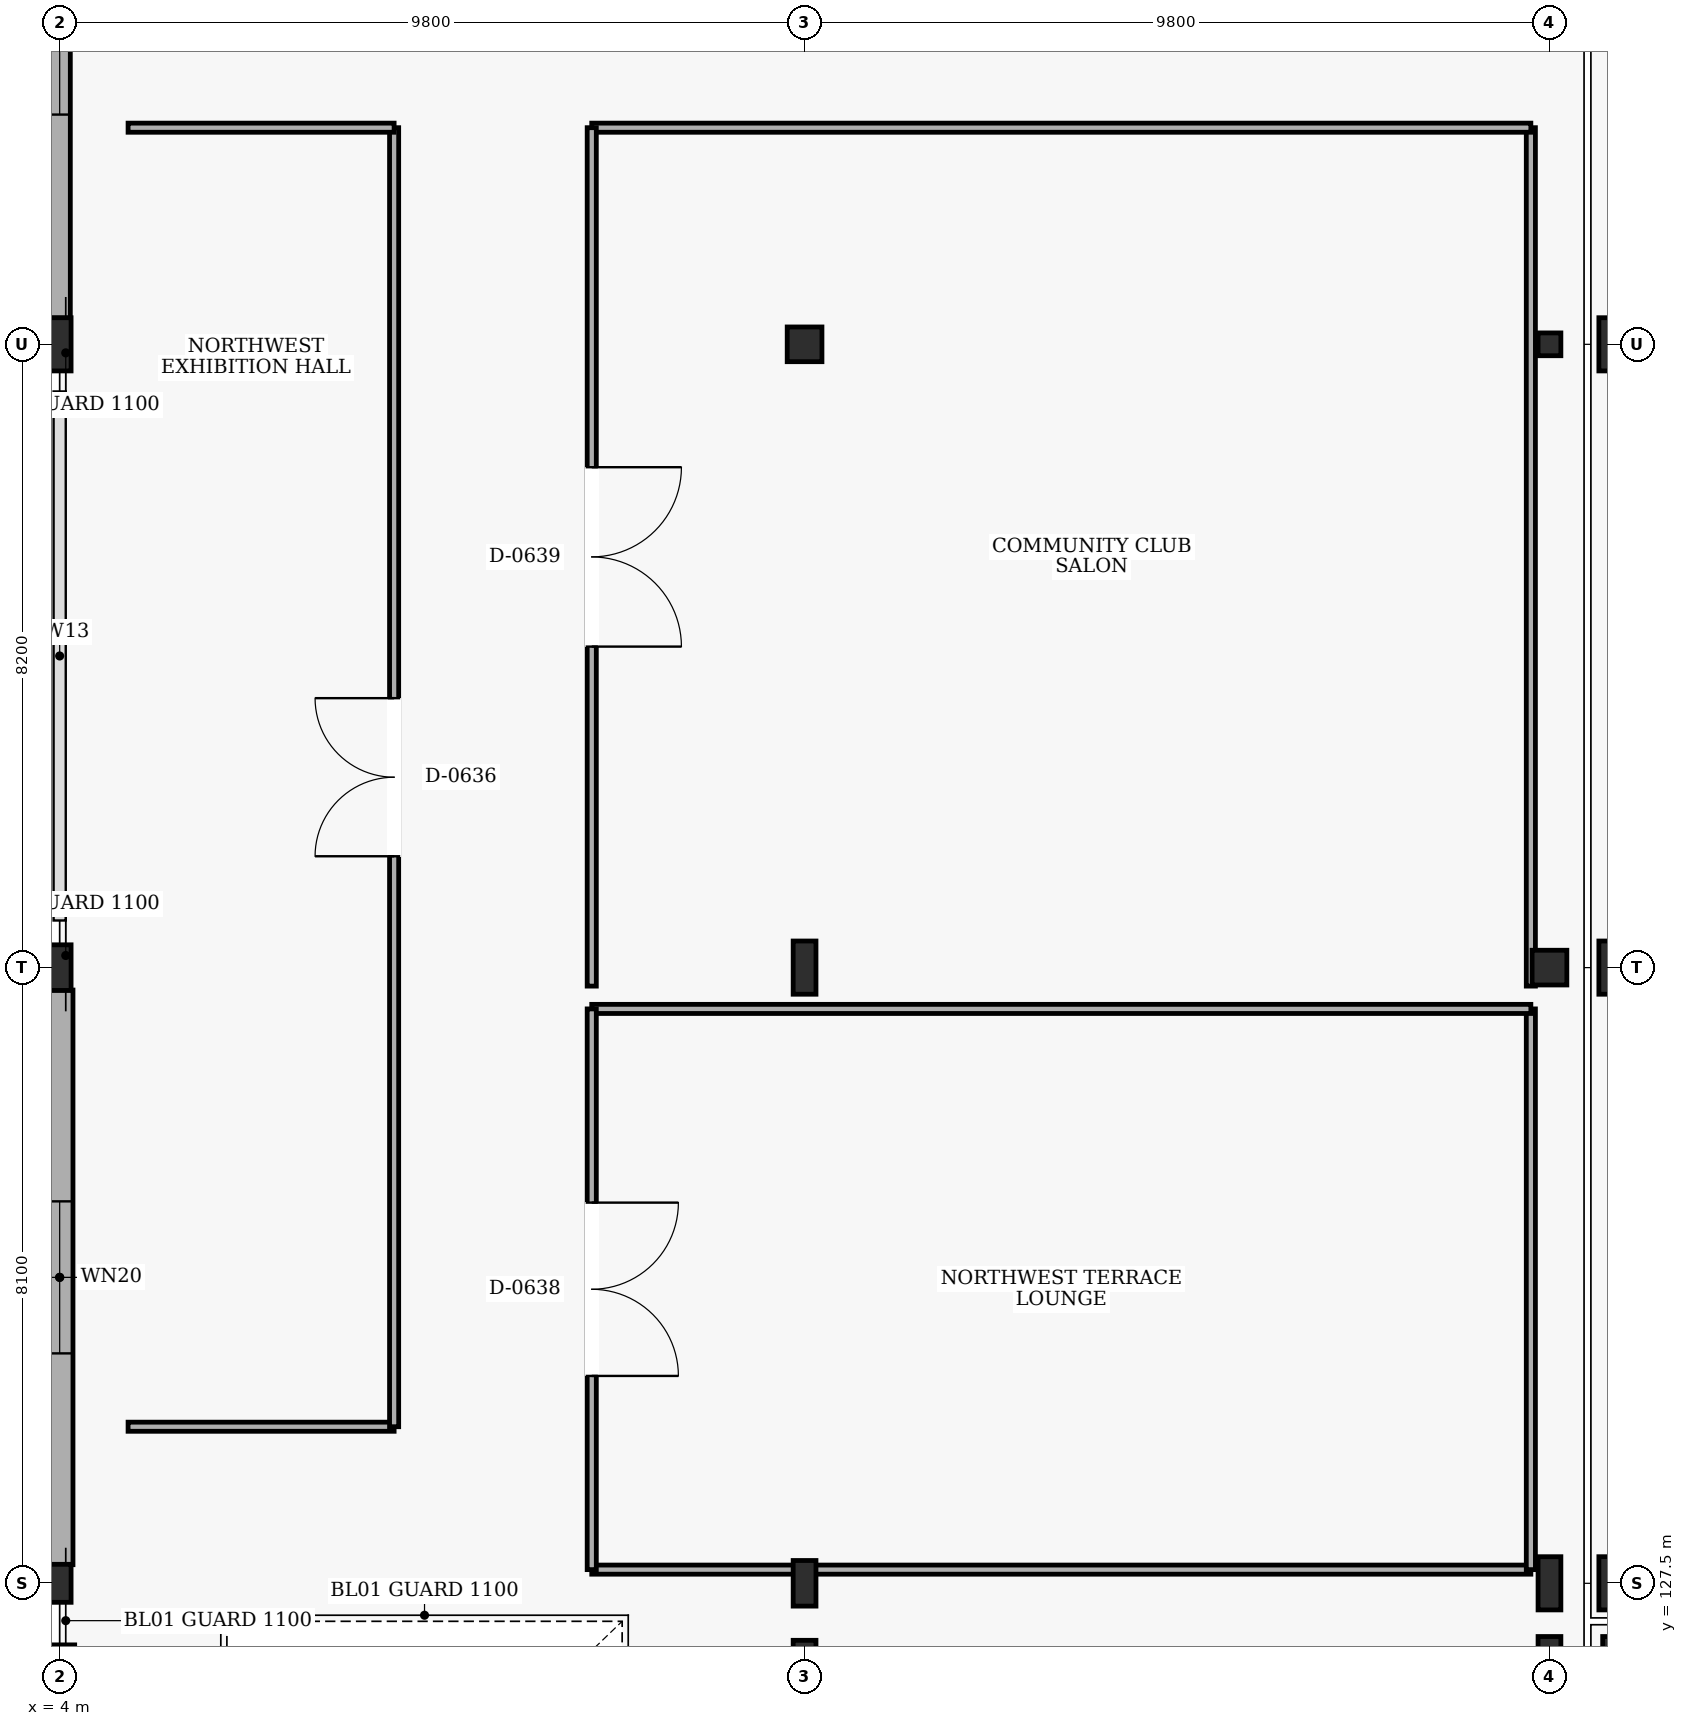
"""IFC4 building model, lengths in metres.
Left out: names, types, materials, properties, quantities, classifications, styles, units other than length and angle.
Written with IfcOpenShell. Run it as: python <this file> out.ifc"""

import sys

from ifc_helpers import new_model, si_unit, direction, frame, frame_2d, origin, origin_2d, place, context, subcontext, project, spatial, rectangle, hollow_rectangle, hollow_circle, i_section, extrude, element, fill, save


model = new_model("IFC4")
c1 = context("Model", 3, precision=1e-05, world=origin(), true_north=direction((0.0, 1.0)))
c2 = subcontext(c1, "Body", "Model", "MODEL_VIEW")
j1 = project(units=[si_unit("LENGTHUNIT", "METRE"), si_unit("PLANEANGLEUNIT", "RADIAN")], contexts=[c1])
p1 = place(None, origin())
s1 = spatial("IfcSite", under=j1, at=p1, CompositionType="ELEMENT")
p2 = place(p1, origin())
s2 = spatial("IfcBuilding", under=s1, at=p2, CompositionType="ELEMENT")
p3 = place(p2, frame((0.0, 0.0, 10.2)))
s3 = spatial("IfcBuildingStorey", under=s2, at=p3, CompositionType="ELEMENT", Elevation=10.2)
p4 = place(p3, frame((4.0, 126.5, 0.0), z_axis=(0.0, 0.0, 1.0), x_axis=(1.0, 0.0, 0.0)))
e1 = element("IfcColumn", 1, at=p4, inside=s3, PredefinedType="COLUMN", context=c2, shape_type="SweptSolid", body=[
    extrude(i_section(OverallWidth=0.395, OverallDepth=0.38, WebThickness=0.019, FlangeThickness=0.03, at=origin_2d()), origin(), (0.0, 0.0, 1.0), 4.8),
])
p5 = place(p3, frame((4.0, 127.5, 0.0), z_axis=(0.0, 0.0, 1.0), x_axis=(1.0, 0.0, 0.0)))
e2 = element("IfcColumn", 2, at=p5, inside=s3, PredefinedType="COLUMN", context=c2, shape_type="SweptSolid", body=[
    extrude(i_section(OverallWidth=0.3, OverallDepth=0.5, WebThickness=0.014, FlangeThickness=0.028, at=origin_2d()), origin(), (0.0, 0.0, 1.0), 4.8),
])
p6 = place(p3, frame((4.0, 135.6, 0.0), z_axis=(0.0, 0.0, 1.0), x_axis=(1.0, 0.0, 0.0)))
e3 = element("IfcColumn", 3, at=p6, inside=s3, PredefinedType="COLUMN", context=c2, shape_type="SweptSolid", body=[
    extrude(i_section(OverallWidth=0.3, OverallDepth=0.6, WebThickness=0.015, FlangeThickness=0.03, at=origin_2d()), origin(), (0.0, 0.0, 1.0), 4.8),
])
p7 = place(p3, frame((4.0, 143.8, 0.0), z_axis=(0.0, 0.0, 1.0), x_axis=(1.0, 0.0, 0.0)))
e4 = element("IfcColumn", 4, at=p7, inside=s3, PredefinedType="COLUMN", context=c2, shape_type="SweptSolid", body=[
    extrude(i_section(OverallWidth=0.3, OverallDepth=0.7, WebThickness=0.017, FlangeThickness=0.032, at=origin_2d()), origin(), (0.0, 0.0, 1.0), 4.8),
])
p8 = place(p3, frame((13.8, 126.5, 0.0), z_axis=(0.0, 0.0, 1.0), x_axis=(1.0, 0.0, 0.0)))
e5 = element("IfcColumn", 5, at=p8, inside=s3, PredefinedType="COLUMN", context=c2, shape_type="SweptSolid", body=[
    extrude(i_section(OverallWidth=0.3, OverallDepth=0.5, WebThickness=0.014, FlangeThickness=0.028, at=origin_2d()), origin(), (0.0, 0.0, 1.0), 4.8),
])
p9 = place(p3, frame((13.8, 127.5, 0.0), z_axis=(0.0, 0.0, 1.0), x_axis=(1.0, 0.0, 0.0)))
e6 = element("IfcColumn", 6, at=p9, inside=s3, PredefinedType="COLUMN", context=c2, shape_type="SweptSolid", body=[
    extrude(i_section(OverallWidth=0.3, OverallDepth=0.6, WebThickness=0.015, FlangeThickness=0.03, at=origin_2d()), origin(), (0.0, 0.0, 1.0), 4.8),
])
p10 = place(p3, frame((13.8, 135.6, 0.0), z_axis=(0.0, 0.0, 1.0), x_axis=(1.0, 0.0, 0.0)))
e7 = element("IfcColumn", 7, at=p10, inside=s3, PredefinedType="COLUMN", context=c2, shape_type="SweptSolid", body=[
    extrude(i_section(OverallWidth=0.3, OverallDepth=0.7, WebThickness=0.017, FlangeThickness=0.032, at=origin_2d()), origin(), (0.0, 0.0, 1.0), 4.8),
])
p11 = place(p3, frame((13.8, 143.8, 0.0), z_axis=(0.0, 0.0, 1.0), x_axis=(1.0, 0.0, 0.0)))
e8 = element("IfcColumn", 8, at=p11, inside=s3, PredefinedType="COLUMN", context=c2, shape_type="SweptSolid", body=[
    extrude(hollow_circle(Radius=0.229, WallThickness=0.02, at=origin_2d()), origin(), (0.0, 0.0, 1.0), 4.8),
])
p12 = place(p3, frame((23.6, 126.5, 0.0), z_axis=(0.0, 0.0, 1.0), x_axis=(1.0, 0.0, 0.0)))
e9 = element("IfcColumn", 9, at=p12, inside=s3, PredefinedType="COLUMN", context=c2, shape_type="SweptSolid", body=[
    extrude(i_section(OverallWidth=0.3, OverallDepth=0.6, WebThickness=0.015, FlangeThickness=0.03, at=origin_2d()), origin(), (0.0, 0.0, 1.0), 4.8),
])
p13 = place(p3, frame((23.6, 127.5, 0.0), z_axis=(0.0, 0.0, 1.0), x_axis=(1.0, 0.0, 0.0)))
e10 = element("IfcColumn", 10, at=p13, inside=s3, PredefinedType="COLUMN", context=c2, shape_type="SweptSolid", body=[
    extrude(i_section(OverallWidth=0.3, OverallDepth=0.7, WebThickness=0.017, FlangeThickness=0.032, at=origin_2d()), origin(), (0.0, 0.0, 1.0), 4.8),
])
p14 = place(p3, frame((23.6, 135.6, 0.0), z_axis=(0.0, 0.0, 1.0), x_axis=(1.0, 0.0, 0.0)))
e11 = element("IfcColumn", 11, at=p14, inside=s3, PredefinedType="COLUMN", context=c2, shape_type="SweptSolid", body=[
    extrude(hollow_circle(Radius=0.229, WallThickness=0.02, at=origin_2d()), origin(), (0.0, 0.0, 1.0), 4.8),
])
p15 = place(p3, frame((23.6, 143.8, 0.0), z_axis=(0.0, 0.0, 1.0), x_axis=(1.0, 0.0, 0.0)))
e12 = element("IfcColumn", 12, at=p15, inside=s3, PredefinedType="COLUMN", context=c2, shape_type="SweptSolid", body=[
    extrude(hollow_rectangle(XDim=0.3, YDim=0.3, WallThickness=0.016, at=origin_2d()), origin(), (0.0, 0.0, 1.0), 4.8),
])
p16 = place(p3, frame((24.6, 126.5, 0.0), z_axis=(0.0, 0.0, 1.0), x_axis=(1.0, 0.0, 0.0)))
e13 = element("IfcColumn", 13, at=p16, inside=s3, PredefinedType="COLUMN", context=c2, shape_type="SweptSolid", body=[
    extrude(rectangle(XDim=0.6, YDim=0.6, at=origin_2d()), origin(), (0.0, 0.0, 1.0), 4.8),
])
for number, where, z_axis, x_axis in (
    (14, (24.6, 127.5, 0.0), (0.0, 0.0, 1.0), (1.0, 0.0, 0.0)),
    (15, (24.6, 135.6, 0.0), (0.0, 0.0, 1.0), (1.0, 0.0, 0.0)),
    (16, (24.6, 143.8, 0.0), (0.0, 0.0, 1.0), (1.0, 0.0, 0.0)),
):
    element("IfcColumn", number, at=place(p3, frame(where, z_axis=z_axis, x_axis=x_axis)), inside=s3, PredefinedType="COLUMN", context=c2, shape_type="SweptSolid", body=[
        extrude(rectangle(XDim=0.7, YDim=0.7, at=origin_2d()), origin(), (0.0, 0.0, 1.0), 4.8),
    ])
p17 = place(p3, frame((4.0, 127.745, 0.0), z_axis=(0.0, 0.0, 1.0), x_axis=(0.0, 1.0, 0.0)))
e17 = element("IfcWall", 17, at=p17, inside=s3, PredefinedType="SOLIDWALL", context=c2, shape_type="SweptSolid", body=[
    extrude(rectangle(XDim=7.56, YDim=0.35, at=frame_2d((3.78, 0.0))), origin(), (0.0, 0.0, 1.0), 3.78),
])
p18 = place(p17, frame((2.78, 0.0, 0.9)))
e18 = element("IfcOpeningElement", 18, at=p18, cuts=e17, PredefinedType="OPENING", context=c2, shape_type="SweptSolid", body=[
    extrude(rectangle(XDim=2.0, YDim=2.4, at=frame_2d((1.0, 1.2))), frame((0.0, 0.185, 0.0), z_axis=(0.0, -1.0, 0.0), x_axis=(1.0, 0.0, 0.0)), (0.0, 0.0, 1.0), 0.37),
])
p19 = place(p3, frame((4.0, 144.145, 0.0), z_axis=(0.0, 0.0, 1.0), x_axis=(0.0, 1.0, 0.0)))
e19 = element("IfcWall", 19, at=p19, inside=s3, PredefinedType="SOLIDWALL", context=c2, shape_type="SweptSolid", body=[
    extrude(rectangle(XDim=7.855, YDim=0.28, at=frame_2d((3.927, 0.0))), origin(), (0.0, 0.0, 1.0), 4.48),
])
p20 = place(p19, frame((2.677, 0.0, 0.9)))
e20 = element("IfcOpeningElement", 20, at=p20, cuts=e19, PredefinedType="OPENING", context=c2, shape_type="SweptSolid", body=[
    extrude(rectangle(XDim=2.5, YDim=2.4, at=frame_2d((1.25, 1.2))), frame((0.0, 0.15, 0.0), z_axis=(0.0, -1.0, 0.0), x_axis=(1.0, 0.0, 0.0)), (0.0, 0.0, 1.0), 0.3),
])
p21 = place(p3, frame((4.9, 129.56, 0.0), z_axis=(0.0, 0.0, 1.0), x_axis=(1.0, 0.0, 0.0)))
e21 = element("IfcWall", 21, at=p21, inside=s3, PredefinedType="PARTITIONING", context=c2, shape_type="SweptSolid", body=[
    extrude(rectangle(XDim=3.5, YDim=0.12, at=frame_2d((1.75, 0.0))), origin(), (0.0, 0.0, 1.0), 4.48),
])
p22 = place(p3, frame((8.4, 129.56, 0.0), z_axis=(0.0, 0.0, 1.0), x_axis=(0.0, 1.0, 0.0)))
e22 = element("IfcWall", 22, at=p22, inside=s3, PredefinedType="PARTITIONING", context=c2, shape_type="SweptSolid", body=[
    extrude(rectangle(XDim=17.09, YDim=0.12, at=frame_2d((8.545, 0.0))), origin(), (0.0, 0.0, 1.0), 4.48),
])
p23 = place(p22, frame((7.505, 0.0, 0.0)))
e23 = element("IfcOpeningElement", 23, at=p23, cuts=e22, PredefinedType="OPENING", context=c2, shape_type="SweptSolid", body=[
    extrude(rectangle(XDim=2.08, YDim=2.35, at=frame_2d((1.04, 1.175))), frame((0.0, 0.07, 0.0), z_axis=(0.0, -1.0, 0.0), x_axis=(1.0, 0.0, 0.0)), (0.0, 0.0, 1.0), 0.14),
])
p24 = place(p3, frame((8.4, 146.65, 0.0), z_axis=(0.0, 0.0, 1.0), x_axis=(-1.0, 0.0, 0.0)))
e24 = element("IfcWall", 24, at=p24, inside=s3, PredefinedType="PARTITIONING", context=c2, shape_type="SweptSolid", body=[
    extrude(rectangle(XDim=3.5, YDim=0.12, at=frame_2d((1.75, 0.0))), origin(), (0.0, 0.0, 1.0), 4.48),
])
p25 = place(p3, frame((11.0, 127.68, 0.0), z_axis=(0.0, 0.0, 1.0), x_axis=(1.0, 0.0, 0.0)))
e25 = element("IfcWall", 25, at=p25, inside=s3, PredefinedType="PARTITIONING", context=c2, shape_type="SweptSolid", body=[
    extrude(rectangle(XDim=12.355, YDim=0.12, at=frame_2d((6.177, 0.0))), origin(), (0.0, 0.0, 1.0), 3.88),
])
p26 = place(p3, frame((23.355, 127.68, 0.0), z_axis=(0.0, 0.0, 1.0), x_axis=(0.0, 1.0, 0.0)))
e26 = element("IfcWall", 26, at=p26, inside=s3, PredefinedType="PARTITIONING", context=c2, shape_type="SweptSolid", body=[
    extrude(rectangle(XDim=7.377, YDim=0.12, at=frame_2d((3.688, 0.0))), origin(), (0.0, 0.0, 1.0), 3.78),
])
p27 = place(p3, frame((23.355, 135.057, 0.0), z_axis=(0.0, 0.0, 1.0), x_axis=(-1.0, 0.0, 0.0)))
e27 = element("IfcWall", 27, at=p27, inside=s3, PredefinedType="PARTITIONING", context=c2, shape_type="SweptSolid", body=[
    extrude(rectangle(XDim=12.355, YDim=0.12, at=frame_2d((6.177, 0.0))), origin(), (0.0, 0.0, 1.0), 4.48),
])
p28 = place(p3, frame((11.0, 135.057, 0.0), z_axis=(0.0, 0.0, 1.0), x_axis=(0.0, -1.0, 0.0)))
e28 = element("IfcWall", 28, at=p28, inside=s3, PredefinedType="PARTITIONING", context=c2, shape_type="SweptSolid", body=[
    extrude(rectangle(XDim=7.377, YDim=0.12, at=frame_2d((3.688, 0.0))), origin(), (0.0, 0.0, 1.0), 4.48),
])
p29 = place(p28, frame((2.548, 0.0, 0.0)))
e29 = element("IfcOpeningElement", 29, at=p29, cuts=e28, PredefinedType="OPENING", context=c2, shape_type="SweptSolid", body=[
    extrude(rectangle(XDim=2.28, YDim=2.4, at=frame_2d((1.14, 1.2))), frame((0.0, 0.07, 0.0), z_axis=(0.0, -1.0, 0.0), x_axis=(1.0, 0.0, 0.0)), (0.0, 0.0, 1.0), 0.14),
])
p30 = place(p3, frame((23.355, 135.357, 0.0), z_axis=(0.0, 0.0, 1.0), x_axis=(0.0, 1.0, 0.0)))
e30 = element("IfcWall", 30, at=p30, inside=s3, PredefinedType="PARTITIONING", context=c2, shape_type="SweptSolid", body=[
    extrude(rectangle(XDim=11.293, YDim=0.12, at=frame_2d((5.646, 0.0))), origin(), (0.0, 0.0, 1.0), 3.78),
])
p31 = place(p3, frame((23.355, 146.65, 0.0), z_axis=(0.0, 0.0, 1.0), x_axis=(-1.0, 0.0, 0.0)))
e31 = element("IfcWall", 31, at=p31, inside=s3, PredefinedType="PARTITIONING", context=c2, shape_type="SweptSolid", body=[
    extrude(rectangle(XDim=12.355, YDim=0.12, at=frame_2d((6.177, 0.0))), origin(), (0.0, 0.0, 1.0), 4.48),
])
p32 = place(p3, frame((11.0, 146.65, 0.0), z_axis=(0.0, 0.0, 1.0), x_axis=(0.0, -1.0, 0.0)))
e32 = element("IfcWall", 32, at=p32, inside=s3, PredefinedType="PARTITIONING", context=c2, shape_type="SweptSolid", body=[
    extrude(rectangle(XDim=11.293, YDim=0.12, at=frame_2d((5.646, 0.0))), origin(), (0.0, 0.0, 1.0), 4.48),
])
p33 = place(p32, frame((4.467, 0.0, 0.0)))
e33 = element("IfcOpeningElement", 33, at=p33, cuts=e32, PredefinedType="OPENING", context=c2, shape_type="SweptSolid", body=[
    extrude(rectangle(XDim=2.36, YDim=2.4, at=frame_2d((1.18, 1.2))), frame((0.0, 0.07, 0.0), z_axis=(0.0, -1.0, 0.0), x_axis=(1.0, 0.0, 0.0)), (0.0, 0.0, 1.0), 0.14),
])
p34 = place(p18, origin())
e34 = element("IfcWindow", 34, at=p34, inside=s3, PartitioningType="SINGLE_PANEL", PredefinedType="WINDOW", context=c2, shape_type="SweptSolid", body=[
    extrude(rectangle(XDim=2.0, YDim=2.4, at=frame_2d((1.0, 1.2))), frame((0.0, 0.03, 0.0), z_axis=(0.0, -1.0, 0.0), x_axis=(1.0, 0.0, 0.0)), (0.0, 0.0, 1.0), 0.06),
])
fill(e18, e34)
p35 = place(p20, origin())
e35 = element("IfcWindow", 35, at=p35, inside=s3, PartitioningType="SINGLE_PANEL", PredefinedType="WINDOW", context=c2, shape_type="SweptSolid", body=[
    extrude(rectangle(XDim=2.5, YDim=2.4, at=frame_2d((1.25, 1.2))), frame((0.0, 0.03, 0.0), z_axis=(0.0, -1.0, 0.0), x_axis=(1.0, 0.0, 0.0)), (0.0, 0.0, 1.0), 0.06),
])
fill(e20, e35)
p36 = place(p23, origin())
e36 = element("IfcDoor", 36, at=p36, inside=s3, OperationType="DOUBLE_DOOR_SINGLE_SWING", PredefinedType="DOOR", context=c2, shape_type="SweptSolid", body=[
    extrude(rectangle(XDim=2.08, YDim=2.35, at=frame_2d((1.04, 1.175))), frame((0.0, 0.025, 0.0), z_axis=(0.0, -1.0, 0.0), x_axis=(1.0, 0.0, 0.0)), (0.0, 0.0, 1.0), 0.05),
])
fill(e23, e36)
p37 = place(p29, origin())
e37 = element("IfcDoor", 37, at=p37, inside=s3, OperationType="DOUBLE_DOOR_SINGLE_SWING", PredefinedType="DOOR", context=c2, shape_type="SweptSolid", body=[
    extrude(rectangle(XDim=2.28, YDim=2.4, at=frame_2d((1.14, 1.2))), frame((0.0, 0.025, 0.0), z_axis=(0.0, -1.0, 0.0), x_axis=(1.0, 0.0, 0.0)), (0.0, 0.0, 1.0), 0.05),
])
fill(e29, e37)
p38 = place(p33, origin())
e38 = element("IfcDoor", 38, at=p38, inside=s3, OperationType="DOUBLE_DOOR_SINGLE_SWING", PredefinedType="DOOR", context=c2, shape_type="SweptSolid", body=[
    extrude(rectangle(XDim=2.36, YDim=2.4, at=frame_2d((1.18, 1.2))), frame((0.0, 0.025, 0.0), z_axis=(0.0, -1.0, 0.0), x_axis=(1.0, 0.0, 0.0)), (0.0, 0.0, 1.0), 0.05),
])
fill(e33, e38)
save(model, sys.argv[1])
